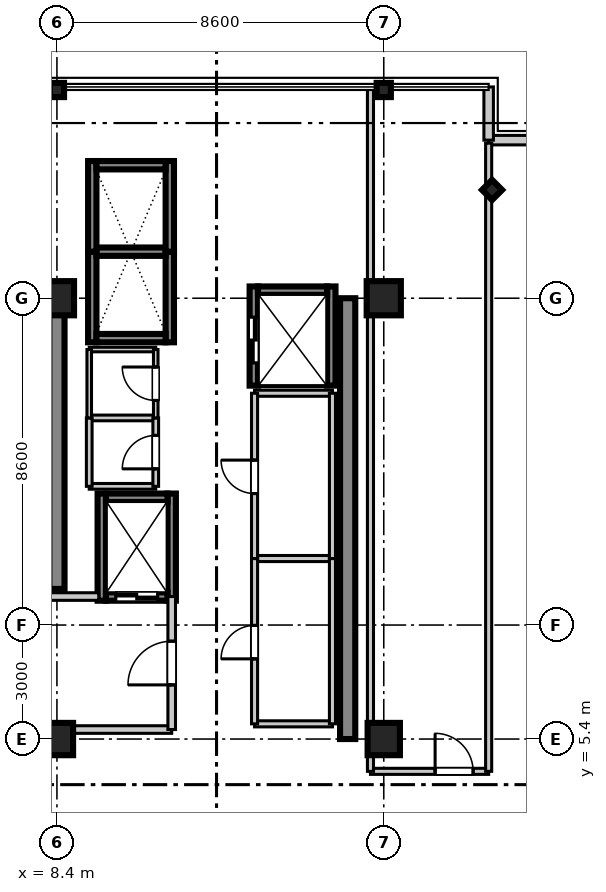
"""IFC4 building model, lengths in metres.
Left out: names, types, materials, properties, quantities, classifications, styles, units other than length and angle.
Written with IfcOpenShell. Run it as: python <this file> out.ifc"""

import sys

from ifc_helpers import new_model, si_unit, direction, frame, frame_2d, origin, origin_2d, place, context, subcontext, project, spatial, rectangle, i_section, extrude, source, transform, mapped, element, fill, save


model = new_model("IFC4")
c1 = context("Model", 3, precision=1e-05, world=origin(), true_north=direction((0.0, 1.0)))
c2 = subcontext(c1, "Body", "Model", "MODEL_VIEW")
j1 = project(units=[si_unit("LENGTHUNIT", "METRE"), si_unit("PLANEANGLEUNIT", "RADIAN")], contexts=[c1])
p1 = place(None, origin())
s1 = spatial("IfcSite", under=j1, at=p1, CompositionType="ELEMENT")
p2 = place(p1, origin())
s2 = spatial("IfcBuilding", under=s1, at=p2, CompositionType="ELEMENT")
p3 = place(p2, frame((0.0, 0.0, 334.75)))
s3 = spatial("IfcBuildingStorey", under=s2, at=p3, CompositionType="ELEMENT", Elevation=334.75)
m1 = source(origin(), c2, "Body", "SweptSolid", [
    extrude(rectangle(XDim=0.85, YDim=0.85, at=origin_2d()), origin(), (0.0, 0.0, 1.0), 3.755),
])
p4 = place(p3, frame((8.4, 5.4, 0.0), z_axis=(0.0, 0.0, 1.0), x_axis=(1.0, 0.0, 0.0)))
e1 = element("IfcColumn", 1, at=p4, inside=s3, PredefinedType="PILASTER", context=c2, shape_type="MappedRepresentation", body=[
    mapped(m1, transform((0.0, 0.0, 0.0), scale=1.0)),
])
m2 = source(origin(), c2, "Body", "SweptSolid", [
    extrude(rectangle(XDim=0.9, YDim=0.9, at=origin_2d()), origin(), (0.0, 0.0, 1.0), 3.755),
])
p5 = place(p3, frame((8.4, 17.0, 0.0), z_axis=(0.0, 0.0, 1.0), x_axis=(1.0, 0.0, 0.0)))
e2 = element("IfcColumn", 2, at=p5, inside=s3, PredefinedType="COLUMN", context=c2, shape_type="MappedRepresentation", body=[
    mapped(m2, transform((0.0, 0.0, 0.0), scale=1.0)),
])
p6 = place(p3, frame((17.0, 5.4, 0.0), z_axis=(0.0, 0.0, 1.0), x_axis=(1.0, 0.0, 0.0)))
e3 = element("IfcColumn", 3, at=p6, inside=s3, PredefinedType="PILASTER", context=c2, shape_type="MappedRepresentation", body=[
    mapped(m1, transform((0.0, 0.0, 0.0), scale=1.0)),
])
p7 = place(p3, frame((17.0, 17.0, 0.0), z_axis=(0.0, 0.0, 1.0), x_axis=(1.0, 0.0, 0.0)))
e4 = element("IfcColumn", 4, at=p7, inside=s3, PredefinedType="COLUMN", context=c2, shape_type="MappedRepresentation", body=[
    mapped(m2, transform((0.0, 0.0, 0.0), scale=1.0)),
])
m3 = source(origin(), c2, "Body", "SweptSolid", [
    extrude(i_section(OverallWidth=0.374, OverallDepth=0.374, WebThickness=0.014, FlangeThickness=0.023, at=origin_2d()), origin(), (0.0, 0.0, 1.0), 3.755),
])
for number, where, z_axis, x_axis in (
    (5, (8.4, 22.48, 0.0), (0.0, 0.0, 1.0), (0.0, 1.0, 0.0)),
    (6, (17.0, 22.48, 0.0), (0.0, 0.0, 1.0), (0.0, 1.0, 0.0)),
    (7, (19.85, 19.85, 0.0), (0.0, 0.0, 1.0), (0.707, 0.707, 0.0)),
):
    element("IfcColumn", number, at=place(p3, frame(where, z_axis=z_axis, x_axis=x_axis)), inside=s3, PredefinedType="COLUMN", context=c2, shape_type="MappedRepresentation", body=[
        mapped(m3, transform((0.0, 0.0, 0.0), scale=1.0)),
    ])
m4 = source(origin(), c2, "Body", "SweptSolid", [
    extrude(rectangle(XDim=7.65, YDim=0.4, at=frame_2d((3.825, 0.0))), origin(), (0.0, 0.0, 1.0), 3.47),
])
p8 = place(p3, frame((8.4, 9.35, 0.0), z_axis=(0.0, 0.0, 1.0), x_axis=(0.0, 1.0, 0.0)))
e8 = element("IfcWall", 8, at=p8, inside=s3, PredefinedType="SHEAR", context=c2, shape_type="MappedRepresentation", body=[
    mapped(m4, transform((0.0, 0.0, 0.0), scale=1.0)),
])
m5 = source(origin(), c2, "Body", "SweptSolid", [
    extrude(rectangle(XDim=11.6, YDim=0.4, at=frame_2d((5.8, 0.0))), origin(), (0.0, 0.0, 1.0), 3.47),
])
p9 = place(p3, frame((16.05, 5.4, 0.0), z_axis=(0.0, 0.0, 1.0), x_axis=(0.0, 1.0, 0.0)))
e9 = element("IfcWall", 9, at=p9, inside=s3, PredefinedType="SHEAR", context=c2, shape_type="MappedRepresentation", body=[
    mapped(m5, transform((0.0, 0.0, 0.0), scale=1.0)),
])
m6 = source(origin(), c2, "Body", "SweptSolid", [
    extrude(rectangle(XDim=2.385, YDim=0.22, at=frame_2d((1.192, 0.0))), origin(), (0.0, 0.0, 1.0), 3.47),
])
for number, where, z_axis, x_axis in (
    (10, (9.33, 15.84, 0.0), (0.0, 0.0, 1.0), (0.0, 1.0, 0.0)),
    (11, (11.37, 15.84, 0.0), (0.0, 0.0, 1.0), (0.0, 1.0, 0.0)),
):
    element("IfcWall", number, at=place(p3, frame(where, z_axis=z_axis, x_axis=x_axis)), inside=s3, PredefinedType="SHEAR", context=c2, shape_type="MappedRepresentation", body=[
        mapped(m6, transform((0.0, 0.0, 0.0), scale=1.0)),
    ])
m7 = source(origin(), c2, "Body", "SweptSolid", [
    extrude(rectangle(XDim=1.82, YDim=0.22, at=frame_2d((0.91, 0.0))), origin(), (0.0, 0.0, 1.0), 3.47),
])
p10 = place(p3, frame((9.44, 15.95, 0.0), z_axis=(0.0, 0.0, 1.0), x_axis=(1.0, 0.0, 0.0)))
e12 = element("IfcWall", 12, at=p10, inside=s3, PredefinedType="SHEAR", context=c2, shape_type="MappedRepresentation", body=[
    mapped(m7, transform((0.0, 0.0, 0.0), scale=1.0)),
])
m8 = source(origin(), c2, "Body", "SweptSolid", [
    extrude(rectangle(XDim=1.82, YDim=0.22, at=frame_2d((0.91, 0.0))), origin(), (0.0, 0.0, 1.0), 3.8),
])
p11 = place(p3, frame((9.44, 18.225, 0.0), z_axis=(0.0, 0.0, 1.0), x_axis=(1.0, 0.0, 0.0)))
e13 = element("IfcWall", 13, at=p11, inside=s3, PredefinedType="SHEAR", context=c2, shape_type="MappedRepresentation", body=[
    mapped(m8, transform((0.0, 0.0, 0.0), scale=1.0)),
])
for number, where, z_axis, x_axis in (
    (14, (9.33, 18.225, 0.0), (0.0, 0.0, 1.0), (0.0, 1.0, 0.0)),
    (15, (11.37, 18.225, 0.0), (0.0, 0.0, 1.0), (0.0, 1.0, 0.0)),
):
    element("IfcWall", number, at=place(p3, frame(where, z_axis=z_axis, x_axis=x_axis)), inside=s3, PredefinedType="SHEAR", context=c2, shape_type="MappedRepresentation", body=[
        mapped(m6, transform((0.0, 0.0, 0.0), scale=1.0)),
    ])
p12 = place(p3, frame((9.44, 20.5, 0.0), z_axis=(0.0, 0.0, 1.0), x_axis=(1.0, 0.0, 0.0)))
e16 = element("IfcWall", 16, at=p12, inside=s3, PredefinedType="SHEAR", context=c2, shape_type="MappedRepresentation", body=[
    mapped(m7, transform((0.0, 0.0, 0.0), scale=1.0)),
])
m9 = source(origin(), c2, "Body", "SweptSolid", [
    extrude(rectangle(XDim=2.82, YDim=0.22, at=frame_2d((1.41, 0.0))), origin(), (0.0, 0.0, 1.0), 3.47),
])
for number, where, z_axis, x_axis in (
    (17, (9.58, 9.04, 0.0), (0.0, 0.0, 1.0), (0.0, 1.0, 0.0)),
    (18, (11.42, 9.04, 0.0), (0.0, 0.0, 1.0), (0.0, 1.0, 0.0)),
):
    element("IfcWall", number, at=place(p3, frame(where, z_axis=z_axis, x_axis=x_axis)), inside=s3, PredefinedType="SHEAR", context=c2, shape_type="MappedRepresentation", body=[
        mapped(m9, transform((0.0, 0.0, 0.0), scale=1.0)),
    ])
m10 = source(origin(), c2, "Body", "SweptSolid", [
    extrude(rectangle(XDim=1.62, YDim=0.22, at=frame_2d((0.81, 0.0))), origin(), (0.0, 0.0, 1.0), 3.47),
])
p13 = place(p3, frame((9.69, 9.15, 0.0), z_axis=(0.0, 0.0, 1.0), x_axis=(1.0, 0.0, 0.0)))
e19 = element("IfcWall", 19, at=p13, inside=s3, PredefinedType="SHEAR", context=c2, shape_type="MappedRepresentation", body=[
    mapped(m10, transform((0.0, 0.0, 0.0), scale=1.0)),
])
p14 = place(p13, frame((0.26, 0.0, 0.0)))
e20 = element("IfcOpeningElement", 20, at=p14, cuts=e19, PredefinedType="OPENING", context=c2, shape_type="SweptSolid", body=[
    extrude(rectangle(XDim=1.1, YDim=2.2, at=frame_2d((0.55, 1.1))), frame((0.0, 0.12, 0.0), z_axis=(0.0, -1.0, 0.0), x_axis=(1.0, 0.0, 0.0)), (0.0, 0.0, 1.0), 0.24),
])
p15 = place(p3, frame((9.69, 11.75, 0.0), z_axis=(0.0, 0.0, 1.0), x_axis=(1.0, 0.0, 0.0)))
e21 = element("IfcWall", 21, at=p15, inside=s3, PredefinedType="SHEAR", context=c2, shape_type="MappedRepresentation", body=[
    mapped(m10, transform((0.0, 0.0, 0.0), scale=1.0)),
])
m11 = source(origin(), c2, "Body", "SweptSolid", [
    extrude(rectangle(XDim=2.61, YDim=0.22, at=frame_2d((1.305, 0.0))), origin(), (0.0, 0.0, 1.0), 3.47),
])
p16 = place(p3, frame((13.58, 14.7, 0.0), z_axis=(0.0, 0.0, 1.0), x_axis=(0.0, 1.0, 0.0)))
e22 = element("IfcWall", 22, at=p16, inside=s3, PredefinedType="SHEAR", context=c2, shape_type="MappedRepresentation", body=[
    mapped(m11, transform((0.0, 0.0, 0.0), scale=1.0)),
])
p17 = place(p16, frame((0.6, 0.0, 0.0)))
e23 = element("IfcOpeningElement", 23, at=p17, cuts=e22, PredefinedType="OPENING", context=c2, shape_type="SweptSolid", body=[
    extrude(rectangle(XDim=1.2, YDim=2.2, at=frame_2d((0.6, 1.1))), frame((0.0, 0.12, 0.0), z_axis=(0.0, -1.0, 0.0), x_axis=(1.0, 0.0, 0.0)), (0.0, 0.0, 1.0), 0.24),
])
p18 = place(p3, frame((15.62, 14.7, 0.0), z_axis=(0.0, 0.0, 1.0), x_axis=(0.0, 1.0, 0.0)))
e24 = element("IfcWall", 24, at=p18, inside=s3, PredefinedType="SHEAR", context=c2, shape_type="MappedRepresentation", body=[
    mapped(m11, transform((0.0, 0.0, 0.0), scale=1.0)),
])
p19 = place(p3, frame((13.69, 17.2, 0.0), z_axis=(0.0, 0.0, 1.0), x_axis=(1.0, 0.0, 0.0)))
e25 = element("IfcWall", 25, at=p19, inside=s3, PredefinedType="SHEAR", context=c2, shape_type="MappedRepresentation", body=[
    mapped(m7, transform((0.0, 0.0, 0.0), scale=1.0)),
])
m12 = source(origin(), c2, "Body", "SweptSolid", [
    extrude(rectangle(XDim=1.4, YDim=0.25, at=frame_2d((0.7, 0.0))), origin(), (0.0, 0.0, 1.0), 3.47),
])
p20 = place(p3, frame((19.76, 21.16, 0.0), z_axis=(0.0, 0.0, 1.0), x_axis=(1.0, 0.0, 0.0)))
e26 = element("IfcWall", 26, at=p20, inside=s3, PredefinedType="STANDARD", context=c2, shape_type="MappedRepresentation", body=[
    mapped(m12, transform((0.0, 0.0, 0.0), scale=1.0)),
])
m13 = source(origin(), c2, "Body", "SweptSolid", [
    extrude(rectangle(XDim=1.4, YDim=0.25, at=frame_2d((0.7, 0.0))), origin(), (0.0, 0.0, 1.0), 3.47),
])
p21 = place(p3, frame((19.76, 21.16, 0.0), z_axis=(0.0, 0.0, 1.0), x_axis=(0.0, 1.0, 0.0)))
e27 = element("IfcWall", 27, at=p21, inside=s3, PredefinedType="STANDARD", context=c2, shape_type="MappedRepresentation", body=[
    mapped(m13, transform((0.0, 0.0, 0.0), scale=1.0)),
])
m14 = source(origin(), c2, "Body", "SweptSolid", [
    extrude(rectangle(XDim=3.82, YDim=0.2, at=frame_2d((1.91, 0.0))), origin(), (0.0, 0.0, 1.0), 2.81),
])
p22 = place(p3, frame((7.6, 5.65, 0.0), z_axis=(0.0, 0.0, 1.0), x_axis=(1.0, 0.0, 0.0)))
e28 = element("IfcWall", 28, at=p22, inside=s3, PredefinedType="PARTITIONING", context=c2, shape_type="MappedRepresentation", body=[
    mapped(m14, transform((0.0, 0.0, 0.0), scale=1.0)),
])
m15 = source(origin(), c2, "Body", "SweptSolid", [
    extrude(rectangle(XDim=1.9, YDim=0.2, at=frame_2d((0.95, 0.0))), origin(), (0.0, 0.0, 1.0), 2.81),
])
p23 = place(p3, frame((7.6, 9.15, 0.0), z_axis=(0.0, 0.0, 1.0), x_axis=(1.0, 0.0, 0.0)))
e29 = element("IfcWall", 29, at=p23, inside=s3, PredefinedType="PARTITIONING", context=c2, shape_type="MappedRepresentation", body=[
    mapped(m15, transform((0.0, 0.0, 0.0), scale=1.0)),
])
m16 = source(origin(), c2, "Body", "SweptSolid", [
    extrude(rectangle(XDim=3.5, YDim=0.2, at=frame_2d((1.75, 0.0))), origin(), (0.0, 0.0, 1.0), 2.81),
])
p24 = place(p3, frame((11.42, 5.65, 0.0), z_axis=(0.0, 0.0, 1.0), x_axis=(0.0, 1.0, 0.0)))
e30 = element("IfcWall", 30, at=p24, inside=s3, PredefinedType="PARTITIONING", context=c2, shape_type="MappedRepresentation", body=[
    mapped(m16, transform((0.0, 0.0, 0.0), scale=1.0)),
])
p25 = place(p24, frame((1.175, 0.0, 0.0)))
e31 = element("IfcOpeningElement", 31, at=p25, cuts=e30, PredefinedType="OPENING", context=c2, shape_type="SweptSolid", body=[
    extrude(rectangle(XDim=1.15, YDim=2.15, at=frame_2d((0.575, 1.075))), frame((0.0, 0.11, 0.0), z_axis=(0.0, -1.0, 0.0), x_axis=(1.0, 0.0, 0.0)), (0.0, 0.0, 1.0), 0.22),
])
m17 = source(origin(), c2, "Body", "SweptSolid", [
    extrude(rectangle(XDim=1.75, YDim=0.15, at=frame_2d((0.875, 0.0))), origin(), (0.0, 0.0, 1.0), 2.81),
])
for number, where, z_axis, x_axis in (
    (32, (9.25, 12.05, 0.0), (0.0, 0.0, 1.0), (1.0, 0.0, 0.0)),
    (33, (9.25, 13.85, 0.0), (0.0, 0.0, 1.0), (1.0, 0.0, 0.0)),
):
    element("IfcWall", number, at=place(p3, frame(where, z_axis=z_axis, x_axis=x_axis)), inside=s3, PredefinedType="PARTITIONING", context=c2, shape_type="MappedRepresentation", body=[
        mapped(m17, transform((0.0, 0.0, 0.0), scale=1.0)),
    ])
m18 = source(origin(), c2, "Body", "SweptSolid", [
    extrude(rectangle(XDim=1.8, YDim=0.15, at=frame_2d((0.9, 0.0))), origin(), (0.0, 0.0, 1.0), 2.81),
])
p26 = place(p3, frame((9.25, 12.05, 0.0), z_axis=(0.0, 0.0, 1.0), x_axis=(0.0, 1.0, 0.0)))
e34 = element("IfcWall", 34, at=p26, inside=s3, PredefinedType="PARTITIONING", context=c2, shape_type="MappedRepresentation", body=[
    mapped(m18, transform((0.0, 0.0, 0.0), scale=1.0)),
])
p27 = place(p3, frame((11.0, 12.05, 0.0), z_axis=(0.0, 0.0, 1.0), x_axis=(0.0, 1.0, 0.0)))
e35 = element("IfcWall", 35, at=p27, inside=s3, PredefinedType="PARTITIONING", context=c2, shape_type="MappedRepresentation", body=[
    mapped(m18, transform((0.0, 0.0, 0.0), scale=1.0)),
])
p28 = place(p27, frame((0.46, 0.0, 0.0)))
e36 = element("IfcOpeningElement", 36, at=p28, cuts=e35, PredefinedType="OPENING", context=c2, shape_type="SweptSolid", body=[
    extrude(rectangle(XDim=0.88, YDim=2.1, at=frame_2d((0.44, 1.05))), frame((0.0, 0.085, 0.0), z_axis=(0.0, -1.0, 0.0), x_axis=(1.0, 0.0, 0.0)), (0.0, 0.0, 1.0), 0.17),
])
m19 = source(origin(), c2, "Body", "SweptSolid", [
    extrude(rectangle(XDim=1.75, YDim=0.12, at=frame_2d((0.875, 0.0))), origin(), (0.0, 0.0, 1.0), 2.81),
])
p29 = place(p3, frame((9.25, 15.65, 0.0), z_axis=(0.0, 0.0, 1.0), x_axis=(1.0, 0.0, 0.0)))
e37 = element("IfcWall", 37, at=p29, inside=s3, PredefinedType="PARTITIONING", context=c2, shape_type="MappedRepresentation", body=[
    mapped(m19, transform((0.0, 0.0, 0.0), scale=1.0)),
])
m20 = source(origin(), c2, "Body", "SweptSolid", [
    extrude(rectangle(XDim=1.8, YDim=0.12, at=frame_2d((0.9, 0.0))), origin(), (0.0, 0.0, 1.0), 2.81),
])
p30 = place(p3, frame((9.25, 13.85, 0.0), z_axis=(0.0, 0.0, 1.0), x_axis=(0.0, 1.0, 0.0)))
e38 = element("IfcWall", 38, at=p30, inside=s3, PredefinedType="PARTITIONING", context=c2, shape_type="MappedRepresentation", body=[
    mapped(m20, transform((0.0, 0.0, 0.0), scale=1.0)),
])
p31 = place(p3, frame((11.0, 13.85, 0.0), z_axis=(0.0, 0.0, 1.0), x_axis=(0.0, 1.0, 0.0)))
e39 = element("IfcWall", 39, at=p31, inside=s3, PredefinedType="PARTITIONING", context=c2, shape_type="MappedRepresentation", body=[
    mapped(m20, transform((0.0, 0.0, 0.0), scale=1.0)),
])
p32 = place(p31, frame((0.46, 0.0, 0.0)))
e40 = element("IfcOpeningElement", 40, at=p32, cuts=e39, PredefinedType="OPENING", context=c2, shape_type="SweptSolid", body=[
    extrude(rectangle(XDim=0.88, YDim=2.1, at=frame_2d((0.44, 1.05))), frame((0.0, 0.07, 0.0), z_axis=(0.0, -1.0, 0.0), x_axis=(1.0, 0.0, 0.0)), (0.0, 0.0, 1.0), 0.14),
])
m21 = source(origin(), c2, "Body", "SweptSolid", [
    extrude(rectangle(XDim=2.05, YDim=0.16, at=frame_2d((1.025, 0.0))), origin(), (0.0, 0.0, 1.0), 2.81),
])
for number, where, z_axis, x_axis in (
    (41, (13.6, 5.8, 0.0), (0.0, 0.0, 1.0), (1.0, 0.0, 0.0)),
    (42, (13.6, 10.15, 0.0), (0.0, 0.0, 1.0), (1.0, 0.0, 0.0)),
):
    element("IfcWall", number, at=place(p3, frame(where, z_axis=z_axis, x_axis=x_axis)), inside=s3, PredefinedType="PARTITIONING", context=c2, shape_type="MappedRepresentation", body=[
        mapped(m21, transform((0.0, 0.0, 0.0), scale=1.0)),
    ])
m22 = source(origin(), c2, "Body", "SweptSolid", [
    extrude(rectangle(XDim=4.35, YDim=0.16, at=frame_2d((2.175, 0.0))), origin(), (0.0, 0.0, 1.0), 2.81),
])
p33 = place(p3, frame((13.6, 5.8, 0.0), z_axis=(0.0, 0.0, 1.0), x_axis=(0.0, 1.0, 0.0)))
e43 = element("IfcWall", 43, at=p33, inside=s3, PredefinedType="PARTITIONING", context=c2, shape_type="MappedRepresentation", body=[
    mapped(m22, transform((0.0, 0.0, 0.0), scale=1.0)),
])
p34 = place(p33, frame((1.71, 0.0, 0.0)))
e44 = element("IfcOpeningElement", 44, at=p34, cuts=e43, PredefinedType="OPENING", context=c2, shape_type="SweptSolid", body=[
    extrude(rectangle(XDim=0.88, YDim=2.1, at=frame_2d((0.44, 1.05))), frame((0.0, 0.09, 0.0), z_axis=(0.0, -1.0, 0.0), x_axis=(1.0, 0.0, 0.0)), (0.0, 0.0, 1.0), 0.18),
])
p35 = place(p3, frame((15.65, 5.8, 0.0), z_axis=(0.0, 0.0, 1.0), x_axis=(0.0, 1.0, 0.0)))
e45 = element("IfcWall", 45, at=p35, inside=s3, PredefinedType="PARTITIONING", context=c2, shape_type="MappedRepresentation", body=[
    mapped(m22, transform((0.0, 0.0, 0.0), scale=1.0)),
])
p36 = place(p3, frame((13.6, 14.5, 0.0), z_axis=(0.0, 0.0, 1.0), x_axis=(1.0, 0.0, 0.0)))
e46 = element("IfcWall", 46, at=p36, inside=s3, PredefinedType="PARTITIONING", context=c2, shape_type="MappedRepresentation", body=[
    mapped(m21, transform((0.0, 0.0, 0.0), scale=1.0)),
])
m23 = source(origin(), c2, "Body", "SweptSolid", [
    extrude(rectangle(XDim=4.35, YDim=0.16, at=frame_2d((2.175, 0.0))), origin(), (0.0, 0.0, 1.0), 2.81),
])
p37 = place(p3, frame((13.6, 10.15, 0.0), z_axis=(0.0, 0.0, 1.0), x_axis=(0.0, 1.0, 0.0)))
e47 = element("IfcWall", 47, at=p37, inside=s3, PredefinedType="PARTITIONING", context=c2, shape_type="MappedRepresentation", body=[
    mapped(m23, transform((0.0, 0.0, 0.0), scale=1.0)),
])
p38 = place(p37, frame((1.71, 0.0, 0.0)))
e48 = element("IfcOpeningElement", 48, at=p38, cuts=e47, PredefinedType="OPENING", context=c2, shape_type="SweptSolid", body=[
    extrude(rectangle(XDim=0.88, YDim=2.1, at=frame_2d((0.44, 1.05))), frame((0.0, 0.09, 0.0), z_axis=(0.0, -1.0, 0.0), x_axis=(1.0, 0.0, 0.0)), (0.0, 0.0, 1.0), 0.18),
])
p39 = place(p3, frame((15.65, 10.15, 0.0), z_axis=(0.0, 0.0, 1.0), x_axis=(0.0, 1.0, 0.0)))
e49 = element("IfcWall", 49, at=p39, inside=s3, PredefinedType="PARTITIONING", context=c2, shape_type="MappedRepresentation", body=[
    mapped(m23, transform((0.0, 0.0, 0.0), scale=1.0)),
])
m24 = source(origin(), c2, "Body", "SweptSolid", [
    extrude(rectangle(XDim=3.11, YDim=0.16, at=frame_2d((1.555, 0.0))), origin(), (0.0, 0.0, 1.0), 2.81),
])
p40 = place(p3, frame((16.65, 4.55, 0.0), z_axis=(0.0, 0.0, 1.0), x_axis=(1.0, 0.0, 0.0)))
e50 = element("IfcWall", 50, at=p40, inside=s3, PredefinedType="PARTITIONING", context=c2, shape_type="MappedRepresentation", body=[
    mapped(m24, transform((0.0, 0.0, 0.0), scale=1.0)),
])
p41 = place(p40, frame((1.701, 0.0, 0.0)))
e51 = element("IfcOpeningElement", 51, at=p41, cuts=e50, PredefinedType="OPENING", context=c2, shape_type="SweptSolid", body=[
    extrude(rectangle(XDim=1.0, YDim=2.1, at=frame_2d((0.5, 1.05))), frame((0.0, 0.09, 0.0), z_axis=(0.0, -1.0, 0.0), x_axis=(1.0, 0.0, 0.0)), (0.0, 0.0, 1.0), 0.18),
])
m25 = source(origin(), c2, "Body", "SweptSolid", [
    extrude(rectangle(XDim=17.95, YDim=0.16, at=frame_2d((8.975, 0.0))), origin(), (0.0, 0.0, 1.0), 2.81),
])
p42 = place(p3, frame((16.65, 4.55, 0.0), z_axis=(0.0, 0.0, 1.0), x_axis=(0.0, 1.0, 0.0)))
e52 = element("IfcWall", 52, at=p42, inside=s3, PredefinedType="PARTITIONING", context=c2, shape_type="MappedRepresentation", body=[
    mapped(m25, transform((0.0, 0.0, 0.0), scale=1.0)),
])
m26 = source(origin(), c2, "Body", "SweptSolid", [
    extrude(rectangle(XDim=16.53, YDim=0.16, at=frame_2d((8.265, 0.0))), origin(), (0.0, 0.0, 1.0), 2.81),
])
p43 = place(p3, frame((19.76, 4.55, 0.0), z_axis=(0.0, 0.0, 1.0), x_axis=(0.0, 1.0, 0.0)))
e53 = element("IfcWall", 53, at=p43, inside=s3, PredefinedType="PARTITIONING", context=c2, shape_type="MappedRepresentation", body=[
    mapped(m26, transform((0.0, 0.0, 0.0), scale=1.0)),
])
m27 = source(origin(), c2, "Body", "SweptSolid", [
    extrude(rectangle(XDim=1.1, YDim=2.2, at=frame_2d((0.55, 1.1))), frame((0.0, 0.025, 0.0), z_axis=(0.0, -1.0, 0.0), x_axis=(1.0, 0.0, 0.0)), (0.0, 0.0, 1.0), 0.05),
])
p44 = place(p14, frame((1.1, 0.0, 0.0), z_axis=(0.0, 0.0, 1.0), x_axis=(-1.0, 0.0, 0.0)))
e54 = element("IfcDoor", 54, at=p44, inside=s3, OperationType="DOUBLE_DOOR_SLIDING", PredefinedType="DOOR", context=c2, shape_type="MappedRepresentation", body=[
    mapped(m27, transform((0.0, 0.0, 0.0), scale=1.0)),
])
fill(e20, e54)
m28 = source(origin(), c2, "Body", "SweptSolid", [
    extrude(rectangle(XDim=1.2, YDim=2.2, at=frame_2d((0.6, 1.1))), frame((0.0, 0.025, 0.0), z_axis=(0.0, -1.0, 0.0), x_axis=(1.0, 0.0, 0.0)), (0.0, 0.0, 1.0), 0.05),
])
p45 = place(p17, origin())
e55 = element("IfcDoor", 55, at=p45, inside=s3, OperationType="DOUBLE_DOOR_SLIDING", PredefinedType="DOOR", context=c2, shape_type="MappedRepresentation", body=[
    mapped(m28, transform((0.0, 0.0, 0.0), scale=1.0)),
])
fill(e23, e55)
m29 = source(origin(), c2, "Body", "SweptSolid", [
    extrude(rectangle(XDim=1.15, YDim=2.15, at=frame_2d((0.575, 1.075))), frame((0.0, 0.025, 0.0), z_axis=(0.0, -1.0, 0.0), x_axis=(1.0, 0.0, 0.0)), (0.0, 0.0, 1.0), 0.05),
])
p46 = place(p25, frame((1.15, 0.0, 0.0), z_axis=(0.0, 0.0, 1.0), x_axis=(-1.0, 0.0, 0.0)))
e56 = element("IfcDoor", 56, at=p46, inside=s3, OperationType="SINGLE_SWING_LEFT", PredefinedType="DOOR", context=c2, shape_type="MappedRepresentation", body=[
    mapped(m29, transform((0.0, 0.0, 0.0), scale=1.0)),
])
fill(e31, e56)
m30 = source(origin(), c2, "Body", "SweptSolid", [
    extrude(rectangle(XDim=0.88, YDim=2.1, at=frame_2d((0.44, 1.05))), frame((0.0, 0.025, 0.0), z_axis=(0.0, -1.0, 0.0), x_axis=(1.0, 0.0, 0.0)), (0.0, 0.0, 1.0), 0.05),
])
p47 = place(p28, origin())
e57 = element("IfcDoor", 57, at=p47, inside=s3, OperationType="SINGLE_SWING_LEFT", PredefinedType="DOOR", context=c2, shape_type="MappedRepresentation", body=[
    mapped(m30, transform((0.0, 0.0, 0.0), scale=1.0)),
])
fill(e36, e57)
p48 = place(p32, origin())
e58 = element("IfcDoor", 58, at=p48, inside=s3, OperationType="SINGLE_SWING_RIGHT", PredefinedType="DOOR", context=c2, shape_type="MappedRepresentation", body=[
    mapped(m30, transform((0.0, 0.0, 0.0), scale=1.0)),
])
fill(e40, e58)
p49 = place(p34, frame((0.88, 0.0, 0.0), z_axis=(0.0, 0.0, 1.0), x_axis=(-1.0, 0.0, 0.0)))
e59 = element("IfcDoor", 59, at=p49, inside=s3, OperationType="SINGLE_SWING_LEFT", PredefinedType="DOOR", context=c2, shape_type="MappedRepresentation", body=[
    mapped(m30, transform((0.0, 0.0, 0.0), scale=1.0)),
])
fill(e44, e59)
p50 = place(p38, frame((0.88, 0.0, 0.0), z_axis=(0.0, 0.0, 1.0), x_axis=(-1.0, 0.0, 0.0)))
e60 = element("IfcDoor", 60, at=p50, inside=s3, OperationType="SINGLE_SWING_RIGHT", PredefinedType="DOOR", context=c2, shape_type="MappedRepresentation", body=[
    mapped(m30, transform((0.0, 0.0, 0.0), scale=1.0)),
])
fill(e48, e60)
m31 = source(origin(), c2, "Body", "SweptSolid", [
    extrude(rectangle(XDim=1.0, YDim=2.1, at=frame_2d((0.5, 1.05))), frame((0.0, 0.025, 0.0), z_axis=(0.0, -1.0, 0.0), x_axis=(1.0, 0.0, 0.0)), (0.0, 0.0, 1.0), 0.05),
])
p51 = place(p41, origin())
e61 = element("IfcDoor", 61, at=p51, inside=s3, OperationType="SINGLE_SWING_LEFT", PredefinedType="DOOR", context=c2, shape_type="MappedRepresentation", body=[
    mapped(m31, transform((0.0, 0.0, 0.0), scale=1.0)),
])
fill(e51, e61)
save(model, sys.argv[1])
